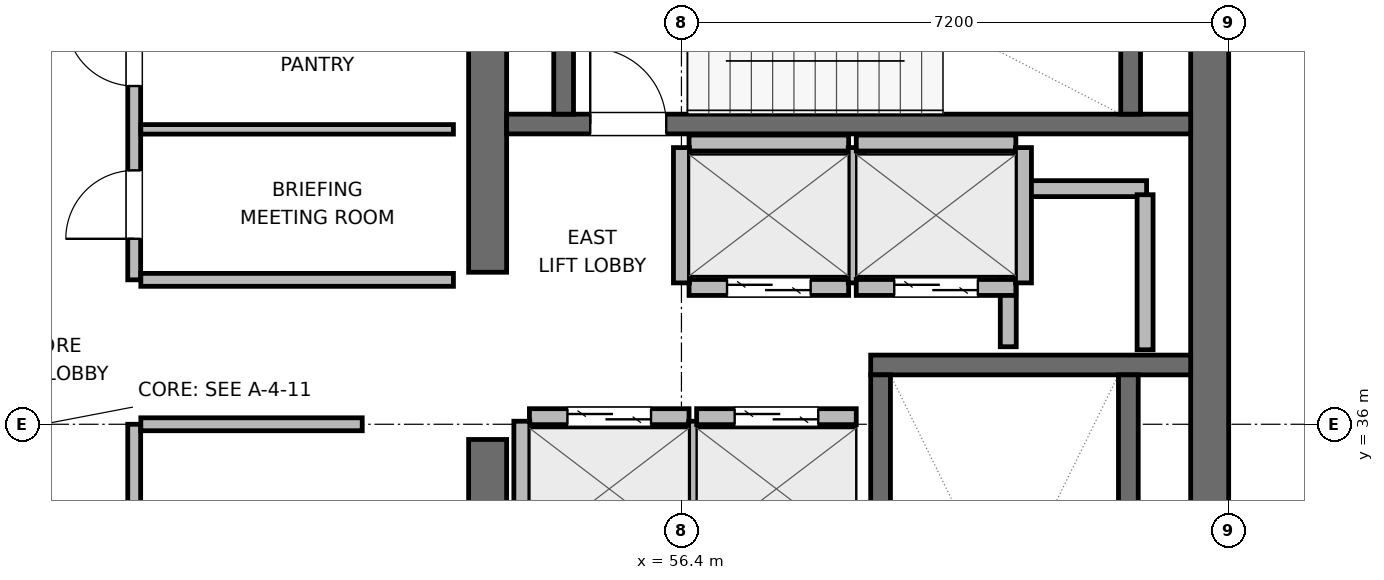
"""IFC4 building model, lengths in metres.
Left out: names, types, materials, properties, quantities, classifications, styles, units other than length and angle.
Written with IfcOpenShell. Run it as: python <this file> out.ifc"""

import sys

from ifc_helpers import new_model, si_unit, direction, frame, frame_2d, origin, place, context, subcontext, project, spatial, rectangle, extrude, element, fill, save


model = new_model("IFC4")
c1 = context("Model", 3, precision=1e-05, world=origin(), true_north=direction((0.0, 1.0)))
c2 = subcontext(c1, "Body", "Model", "MODEL_VIEW")
j1 = project(units=[si_unit("LENGTHUNIT", "METRE"), si_unit("PLANEANGLEUNIT", "RADIAN")], contexts=[c1])
p1 = place(None, origin())
s1 = spatial("IfcSite", under=j1, at=p1, CompositionType="ELEMENT")
p2 = place(p1, origin())
s2 = spatial("IfcBuilding", under=s1, at=p2, CompositionType="ELEMENT")
p3 = place(p2, frame((0.0, 0.0, 342.0)))
s3 = spatial("IfcBuildingStorey", under=s2, at=p3, CompositionType="ELEMENT", Elevation=342.0)
p4 = place(p3, frame((53.85, 27.85, 0.0), z_axis=(0.0, 0.0, 1.0), x_axis=(0.0, 1.0, 0.0)))
e1 = element("IfcWall", 1, at=p4, inside=s3, PredefinedType="SHEAR", context=c2, shape_type="SweptSolid", body=[
    extrude(rectangle(XDim=7.95, YDim=0.5, at=frame_2d((3.975, 0.0))), origin(), (0.0, 0.0, 1.0), 4.5),
])
p5 = place(p3, frame((53.85, 38.0, 0.0), z_axis=(0.0, 0.0, 1.0), x_axis=(0.0, 1.0, 0.0)))
e2 = element("IfcWall", 2, at=p5, inside=s3, PredefinedType="SHEAR", context=c2, shape_type="SweptSolid", body=[
    extrude(rectangle(XDim=6.15, YDim=0.5, at=frame_2d((3.075, 0.0))), origin(), (0.0, 0.0, 1.0), 4.5),
])
p6 = place(p3, frame((63.35, 27.6, 0.0), z_axis=(0.0, 0.0, 1.0), x_axis=(0.0, 1.0, 0.0)))
e3 = element("IfcWall", 3, at=p6, inside=s3, PredefinedType="SHEAR", context=c2, shape_type="SweptSolid", body=[
    extrude(rectangle(XDim=16.8, YDim=0.5, at=frame_2d((8.4, 0.0))), origin(), (0.0, 0.0, 1.0), 4.5),
])
p7 = place(p3, frame((58.89, 36.78, 0.0), z_axis=(0.0, 0.0, 1.0), x_axis=(1.0, 0.0, 0.0)))
e4 = element("IfcWall", 4, at=p7, inside=s3, PredefinedType="SHEAR", context=c2, shape_type="SweptSolid", body=[
    extrude(rectangle(XDim=4.21, YDim=0.26, at=frame_2d((2.105, 0.0))), origin(), (0.0, 0.0, 1.0), 4.5),
])
p8 = place(p3, frame((59.02, 29.05, 0.0), z_axis=(0.0, 0.0, 1.0), x_axis=(0.0, 1.0, 0.0)))
e5 = element("IfcWall", 5, at=p8, inside=s3, PredefinedType="SHEAR", context=c2, shape_type="SweptSolid", body=[
    extrude(rectangle(XDim=7.6, YDim=0.26, at=frame_2d((3.8, 0.0))), origin(), (0.0, 0.0, 1.0), 4.5),
])
p9 = place(p8, frame((0.3, 0.0, 0.0)))
e6 = element("IfcOpeningElement", 6, at=p9, cuts=e5, PredefinedType="OPENING", context=c2, shape_type="SweptSolid", body=[
    extrude(rectangle(XDim=1.0, YDim=2.04, at=frame_2d((0.5, 1.02))), frame((0.0, 0.14, 0.0), z_axis=(0.0, -1.0, 0.0), x_axis=(1.0, 0.0, 0.0)), (0.0, 0.0, 1.0), 0.28),
])
p10 = place(p3, frame((62.28, 29.05, 0.0), z_axis=(0.0, 0.0, 1.0), x_axis=(0.0, 1.0, 0.0)))
e7 = element("IfcWall", 7, at=p10, inside=s3, PredefinedType="SHEAR", context=c2, shape_type="SweptSolid", body=[
    extrude(rectangle(XDim=7.6, YDim=0.26, at=frame_2d((3.8, 0.0))), origin(), (0.0, 0.0, 1.0), 4.5),
])
p11 = place(p3, frame((54.1, 39.95, 0.0), z_axis=(0.0, 0.0, 1.0), x_axis=(1.0, 0.0, 0.0)))
e8 = element("IfcWall", 8, at=p11, inside=s3, PredefinedType="SHEAR", context=c2, shape_type="SweptSolid", body=[
    extrude(rectangle(XDim=9.0, YDim=0.26, at=frame_2d((4.5, 0.0))), origin(), (0.0, 0.0, 1.0), 4.5),
])
p12 = place(p11, frame((1.1, 0.0, 0.0)))
e9 = element("IfcOpeningElement", 9, at=p12, cuts=e8, PredefinedType="OPENING", context=c2, shape_type="SweptSolid", body=[
    extrude(rectangle(XDim=1.0, YDim=2.04, at=frame_2d((0.5, 1.02))), frame((0.0, 0.14, 0.0), z_axis=(0.0, -1.0, 0.0), x_axis=(1.0, 0.0, 0.0)), (0.0, 0.0, 1.0), 0.28),
])
for number, where, z_axis, x_axis in (
    (10, (54.85, 40.08, 0.0), (0.0, 0.0, 1.0), (0.0, 1.0, 0.0)),
    (11, (62.31, 40.08, 0.0), (0.0, 0.0, 1.0), (0.0, 1.0, 0.0)),
):
    element("IfcWall", number, at=place(p3, frame(where, z_axis=z_axis, x_axis=x_axis)), inside=s3, PredefinedType="SHEAR", context=c2, shape_type="SweptSolid", body=[
        extrude(rectangle(XDim=2.94, YDim=0.26, at=frame_2d((1.47, 0.0))), origin(), (0.0, 0.0, 1.0), 4.5),
    ])
p13 = place(p3, frame((60.72, 39.1, 0.0), z_axis=(0.0, 0.0, 1.0), x_axis=(1.0, 0.0, 0.0)))
e12 = element("IfcWall", 12, at=p13, inside=s3, PredefinedType="PARTITIONING", context=c2, shape_type="SweptSolid", body=[
    extrude(rectangle(XDim=1.8, YDim=0.21, at=frame_2d((0.9, 0.0))), origin(), (0.0, 0.0, 1.0), 4.28),
])
p14 = place(p3, frame((60.7, 37.02, 0.0), z_axis=(0.0, 0.0, 1.0), x_axis=(0.0, 1.0, 0.0)))
e13 = element("IfcWall", 13, at=p14, inside=s3, PredefinedType="PARTITIONING", context=c2, shape_type="SweptSolid", body=[
    extrude(rectangle(XDim=1.96, YDim=0.21, at=frame_2d((0.98, 0.0))), origin(), (0.0, 0.0, 1.0), 4.28),
])
p15 = place(p3, frame((62.5, 36.98, 0.0), z_axis=(0.0, 0.0, 1.0), x_axis=(0.0, 1.0, 0.0)))
e14 = element("IfcWall", 14, at=p15, inside=s3, PredefinedType="PARTITIONING", context=c2, shape_type="SweptSolid", body=[
    extrude(rectangle(XDim=2.04, YDim=0.21, at=frame_2d((1.02, 0.0))), origin(), (0.0, 0.0, 1.0), 4.28),
])
p16 = place(p3, frame((54.4, 36.1, 0.0), z_axis=(0.0, 0.0, 1.0), x_axis=(1.0, 0.0, 0.0)))
e15 = element("IfcWall", 15, at=p16, inside=s3, PredefinedType="PARTITIONING", context=c2, shape_type="SweptSolid", body=[
    extrude(rectangle(XDim=2.1, YDim=0.21, at=frame_2d((1.05, 0.0))), origin(), (0.0, 0.0, 1.0), 4.28),
])
p17 = place(p16, frame((0.5, 0.0, 0.0)))
e16 = element("IfcOpeningElement", 16, at=p17, cuts=e15, PredefinedType="OPENING", context=c2, shape_type="SweptSolid", body=[
    extrude(rectangle(XDim=1.1, YDim=2.04, at=frame_2d((0.55, 1.02))), frame((0.0, 0.115, 0.0), z_axis=(0.0, -1.0, 0.0), x_axis=(1.0, 0.0, 0.0)), (0.0, 0.0, 1.0), 0.23),
])
for number, where, z_axis, x_axis in (
    (17, (54.3, 34.26, 0.0), (0.0, 0.0, 1.0), (0.0, 1.0, 0.0)),
    (18, (56.6, 34.26, 0.0), (0.0, 0.0, 1.0), (0.0, 1.0, 0.0)),
):
    element("IfcWall", number, at=place(p3, frame(where, z_axis=z_axis, x_axis=x_axis)), inside=s3, PredefinedType="PARTITIONING", context=c2, shape_type="SweptSolid", body=[
        extrude(rectangle(XDim=1.78, YDim=0.21, at=frame_2d((0.89, 0.0))), origin(), (0.0, 0.0, 1.0), 4.28),
    ])
p18 = place(p3, frame((56.6, 36.1, 0.0), z_axis=(0.0, 0.0, 1.0), x_axis=(1.0, 0.0, 0.0)))
e19 = element("IfcWall", 19, at=p18, inside=s3, PredefinedType="PARTITIONING", context=c2, shape_type="SweptSolid", body=[
    extrude(rectangle(XDim=2.1, YDim=0.21, at=frame_2d((1.05, 0.0))), origin(), (0.0, 0.0, 1.0), 4.28),
])
p19 = place(p18, frame((0.5, 0.0, 0.0)))
e20 = element("IfcOpeningElement", 20, at=p19, cuts=e19, PredefinedType="OPENING", context=c2, shape_type="SweptSolid", body=[
    extrude(rectangle(XDim=1.1, YDim=2.04, at=frame_2d((0.55, 1.02))), frame((0.0, 0.115, 0.0), z_axis=(0.0, -1.0, 0.0), x_axis=(1.0, 0.0, 0.0)), (0.0, 0.0, 1.0), 0.23),
])
p20 = place(p3, frame((56.5, 37.8, 0.0), z_axis=(0.0, 0.0, 1.0), x_axis=(1.0, 0.0, 0.0)))
e21 = element("IfcWall", 21, at=p20, inside=s3, PredefinedType="PARTITIONING", context=c2, shape_type="SweptSolid", body=[
    extrude(rectangle(XDim=2.1, YDim=0.21, at=frame_2d((1.05, 0.0))), origin(), (0.0, 0.0, 1.0), 4.28),
])
p21 = place(p20, frame((0.5, 0.0, 0.0)))
e22 = element("IfcOpeningElement", 22, at=p21, cuts=e21, PredefinedType="OPENING", context=c2, shape_type="SweptSolid", body=[
    extrude(rectangle(XDim=1.1, YDim=2.04, at=frame_2d((0.55, 1.02))), frame((0.0, 0.115, 0.0), z_axis=(0.0, -1.0, 0.0), x_axis=(1.0, 0.0, 0.0)), (0.0, 0.0, 1.0), 0.23),
])
p22 = place(p3, frame((56.5, 39.7, 0.0), z_axis=(0.0, 0.0, 1.0), x_axis=(1.0, 0.0, 0.0)))
e23 = element("IfcWall", 23, at=p22, inside=s3, PredefinedType="PARTITIONING", context=c2, shape_type="SweptSolid", body=[
    extrude(rectangle(XDim=2.1, YDim=0.21, at=frame_2d((1.05, 0.0))), origin(), (0.0, 0.0, 1.0), 4.28),
])
for number, where, z_axis, x_axis in (
    (24, (56.4, 37.86, 0.0), (0.0, 0.0, 1.0), (0.0, 1.0, 0.0)),
    (25, (58.7, 37.86, 0.0), (0.0, 0.0, 1.0), (0.0, 1.0, 0.0)),
):
    element("IfcWall", number, at=place(p3, frame(where, z_axis=z_axis, x_axis=x_axis)), inside=s3, PredefinedType="PARTITIONING", context=c2, shape_type="SweptSolid", body=[
        extrude(rectangle(XDim=1.78, YDim=0.21, at=frame_2d((0.89, 0.0))), origin(), (0.0, 0.0, 1.0), 4.28),
    ])
p23 = place(p3, frame((58.7, 37.8, 0.0), z_axis=(0.0, 0.0, 1.0), x_axis=(1.0, 0.0, 0.0)))
e26 = element("IfcWall", 26, at=p23, inside=s3, PredefinedType="PARTITIONING", context=c2, shape_type="SweptSolid", body=[
    extrude(rectangle(XDim=2.1, YDim=0.21, at=frame_2d((1.05, 0.0))), origin(), (0.0, 0.0, 1.0), 4.28),
])
p24 = place(p23, frame((0.5, 0.0, 0.0)))
e27 = element("IfcOpeningElement", 27, at=p24, cuts=e26, PredefinedType="OPENING", context=c2, shape_type="SweptSolid", body=[
    extrude(rectangle(XDim=1.1, YDim=2.04, at=frame_2d((0.55, 1.02))), frame((0.0, 0.115, 0.0), z_axis=(0.0, -1.0, 0.0), x_axis=(1.0, 0.0, 0.0)), (0.0, 0.0, 1.0), 0.23),
])
p25 = place(p3, frame((58.7, 39.7, 0.0), z_axis=(0.0, 0.0, 1.0), x_axis=(1.0, 0.0, 0.0)))
e28 = element("IfcWall", 28, at=p25, inside=s3, PredefinedType="PARTITIONING", context=c2, shape_type="SweptSolid", body=[
    extrude(rectangle(XDim=2.1, YDim=0.21, at=frame_2d((1.05, 0.0))), origin(), (0.0, 0.0, 1.0), 4.28),
])
p26 = place(p3, frame((60.9, 37.86, 0.0), z_axis=(0.0, 0.0, 1.0), x_axis=(0.0, 1.0, 0.0)))
e29 = element("IfcWall", 29, at=p26, inside=s3, PredefinedType="PARTITIONING", context=c2, shape_type="SweptSolid", body=[
    extrude(rectangle(XDim=1.78, YDim=0.21, at=frame_2d((0.89, 0.0))), origin(), (0.0, 0.0, 1.0), 4.28),
])
p27 = place(p3, frame((49.2, 32.6, 0.0), z_axis=(0.0, 0.0, 1.0), x_axis=(0.0, 1.0, 0.0)))
e30 = element("IfcWall", 30, at=p27, inside=s3, PredefinedType="PARTITIONING", context=c2, shape_type="SweptSolid", body=[
    extrude(rectangle(XDim=3.4, YDim=0.17, at=frame_2d((1.7, 0.0))), origin(), (0.0, 0.0, 1.0), 4.28),
])
p28 = place(p27, frame((1.25, 0.0, 0.0)))
e31 = element("IfcOpeningElement", 31, at=p28, cuts=e30, PredefinedType="OPENING", context=c2, shape_type="SweptSolid", body=[
    extrude(rectangle(XDim=0.9, YDim=2.02, at=frame_2d((0.45, 1.01))), frame((0.0, 0.095, 0.0), z_axis=(0.0, -1.0, 0.0), x_axis=(1.0, 0.0, 0.0)), (0.0, 0.0, 1.0), 0.19),
])
p29 = place(p3, frame((49.287, 36.0, 0.0), z_axis=(0.0, 0.0, 1.0), x_axis=(1.0, 0.0, 0.0)))
e32 = element("IfcWall", 32, at=p29, inside=s3, PredefinedType="PARTITIONING", context=c2, shape_type="SweptSolid", body=[
    extrude(rectangle(XDim=2.913, YDim=0.17, at=frame_2d((1.457, 0.0))), origin(), (0.0, 0.0, 1.0), 4.28),
])
p30 = place(p3, frame((49.2, 37.9, 0.0), z_axis=(0.0, 0.0, 1.0), x_axis=(0.0, 1.0, 0.0)))
e33 = element("IfcWall", 33, at=p30, inside=s3, PredefinedType="PARTITIONING", context=c2, shape_type="SweptSolid", body=[
    extrude(rectangle(XDim=6.0, YDim=0.17, at=frame_2d((3.0, 0.0))), origin(), (0.0, 0.0, 1.0), 4.28),
])
p31 = place(p30, frame((0.54, 0.0, 0.0)))
e34 = element("IfcOpeningElement", 34, at=p31, cuts=e33, PredefinedType="OPENING", context=c2, shape_type="SweptSolid", body=[
    extrude(rectangle(XDim=0.9, YDim=2.02, at=frame_2d((0.45, 1.01))), frame((0.0, 0.095, 0.0), z_axis=(0.0, -1.0, 0.0), x_axis=(1.0, 0.0, 0.0)), (0.0, 0.0, 1.0), 0.19),
])
p32 = place(p30, frame((2.55, 0.0, 0.0)))
e35 = element("IfcOpeningElement", 35, at=p32, cuts=e33, PredefinedType="OPENING", context=c2, shape_type="SweptSolid", body=[
    extrude(rectangle(XDim=0.9, YDim=2.02, at=frame_2d((0.45, 1.01))), frame((0.0, 0.095, 0.0), z_axis=(0.0, -1.0, 0.0), x_axis=(1.0, 0.0, 0.0)), (0.0, 0.0, 1.0), 0.19),
])
p33 = place(p30, frame((4.56, 0.0, 0.0)))
e36 = element("IfcOpeningElement", 36, at=p33, cuts=e33, PredefinedType="OPENING", context=c2, shape_type="SweptSolid", body=[
    extrude(rectangle(XDim=0.9, YDim=2.02, at=frame_2d((0.45, 1.01))), frame((0.0, 0.095, 0.0), z_axis=(0.0, -1.0, 0.0), x_axis=(1.0, 0.0, 0.0)), (0.0, 0.0, 1.0), 0.19),
])
p34 = place(p3, frame((49.287, 37.9, 0.0), z_axis=(0.0, 0.0, 1.0), x_axis=(1.0, 0.0, 0.0)))
e37 = element("IfcWall", 37, at=p34, inside=s3, PredefinedType="PARTITIONING", context=c2, shape_type="SweptSolid", body=[
    extrude(rectangle(XDim=4.113, YDim=0.17, at=frame_2d((2.056, 0.0))), origin(), (0.0, 0.0, 1.0), 4.28),
])
p35 = place(p3, frame((49.287, 39.88, 0.0), z_axis=(0.0, 0.0, 1.0), x_axis=(1.0, 0.0, 0.0)))
e38 = element("IfcWall", 38, at=p35, inside=s3, PredefinedType="PARTITIONING", context=c2, shape_type="SweptSolid", body=[
    extrude(rectangle(XDim=4.113, YDim=0.125, at=frame_2d((2.056, 0.0))), origin(), (0.0, 0.0, 1.0), 4.28),
])
p36 = place(p12, origin())
e39 = element("IfcDoor", 39, at=p36, inside=s3, OperationType="SINGLE_SWING_LEFT", PredefinedType="DOOR", context=c2, shape_type="SweptSolid", body=[
    extrude(rectangle(XDim=1.0, YDim=2.04, at=frame_2d((0.5, 1.02))), frame((0.0, 0.025, 0.0), z_axis=(0.0, -1.0, 0.0), x_axis=(1.0, 0.0, 0.0)), (0.0, 0.0, 1.0), 0.05),
])
fill(e9, e39)
p37 = place(p17, origin())
e40 = element("IfcDoor", 40, at=p37, inside=s3, OperationType="DOUBLE_DOOR_SLIDING", PredefinedType="DOOR", context=c2, shape_type="SweptSolid", body=[
    extrude(rectangle(XDim=1.1, YDim=2.04, at=frame_2d((0.55, 1.02))), frame((0.0, 0.025, 0.0), z_axis=(0.0, -1.0, 0.0), x_axis=(1.0, 0.0, 0.0)), (0.0, 0.0, 1.0), 0.05),
])
fill(e16, e40)
p38 = place(p19, origin())
e41 = element("IfcDoor", 41, at=p38, inside=s3, OperationType="DOUBLE_DOOR_SLIDING", PredefinedType="DOOR", context=c2, shape_type="SweptSolid", body=[
    extrude(rectangle(XDim=1.1, YDim=2.04, at=frame_2d((0.55, 1.02))), frame((0.0, 0.025, 0.0), z_axis=(0.0, -1.0, 0.0), x_axis=(1.0, 0.0, 0.0)), (0.0, 0.0, 1.0), 0.05),
])
fill(e20, e41)
p39 = place(p21, origin())
e42 = element("IfcDoor", 42, at=p39, inside=s3, OperationType="DOUBLE_DOOR_SLIDING", PredefinedType="DOOR", context=c2, shape_type="SweptSolid", body=[
    extrude(rectangle(XDim=1.1, YDim=2.04, at=frame_2d((0.55, 1.02))), frame((0.0, 0.025, 0.0), z_axis=(0.0, -1.0, 0.0), x_axis=(1.0, 0.0, 0.0)), (0.0, 0.0, 1.0), 0.05),
])
fill(e22, e42)
p40 = place(p24, origin())
e43 = element("IfcDoor", 43, at=p40, inside=s3, OperationType="DOUBLE_DOOR_SLIDING", PredefinedType="DOOR", context=c2, shape_type="SweptSolid", body=[
    extrude(rectangle(XDim=1.1, YDim=2.04, at=frame_2d((0.55, 1.02))), frame((0.0, 0.025, 0.0), z_axis=(0.0, -1.0, 0.0), x_axis=(1.0, 0.0, 0.0)), (0.0, 0.0, 1.0), 0.05),
])
fill(e27, e43)
p41 = place(p31, origin())
e44 = element("IfcDoor", 44, at=p41, inside=s3, OperationType="SINGLE_SWING_LEFT", PredefinedType="DOOR", context=c2, shape_type="SweptSolid", body=[
    extrude(rectangle(XDim=0.9, YDim=2.02, at=frame_2d((0.45, 1.01))), frame((0.0, 0.025, 0.0), z_axis=(0.0, -1.0, 0.0), x_axis=(1.0, 0.0, 0.0)), (0.0, 0.0, 1.0), 0.05),
])
fill(e34, e44)
p42 = place(p32, origin())
e45 = element("IfcDoor", 45, at=p42, inside=s3, OperationType="SINGLE_SWING_RIGHT", PredefinedType="DOOR", context=c2, shape_type="SweptSolid", body=[
    extrude(rectangle(XDim=0.9, YDim=2.02, at=frame_2d((0.45, 1.01))), frame((0.0, 0.025, 0.0), z_axis=(0.0, -1.0, 0.0), x_axis=(1.0, 0.0, 0.0)), (0.0, 0.0, 1.0), 0.05),
])
fill(e35, e45)
save(model, sys.argv[1])
